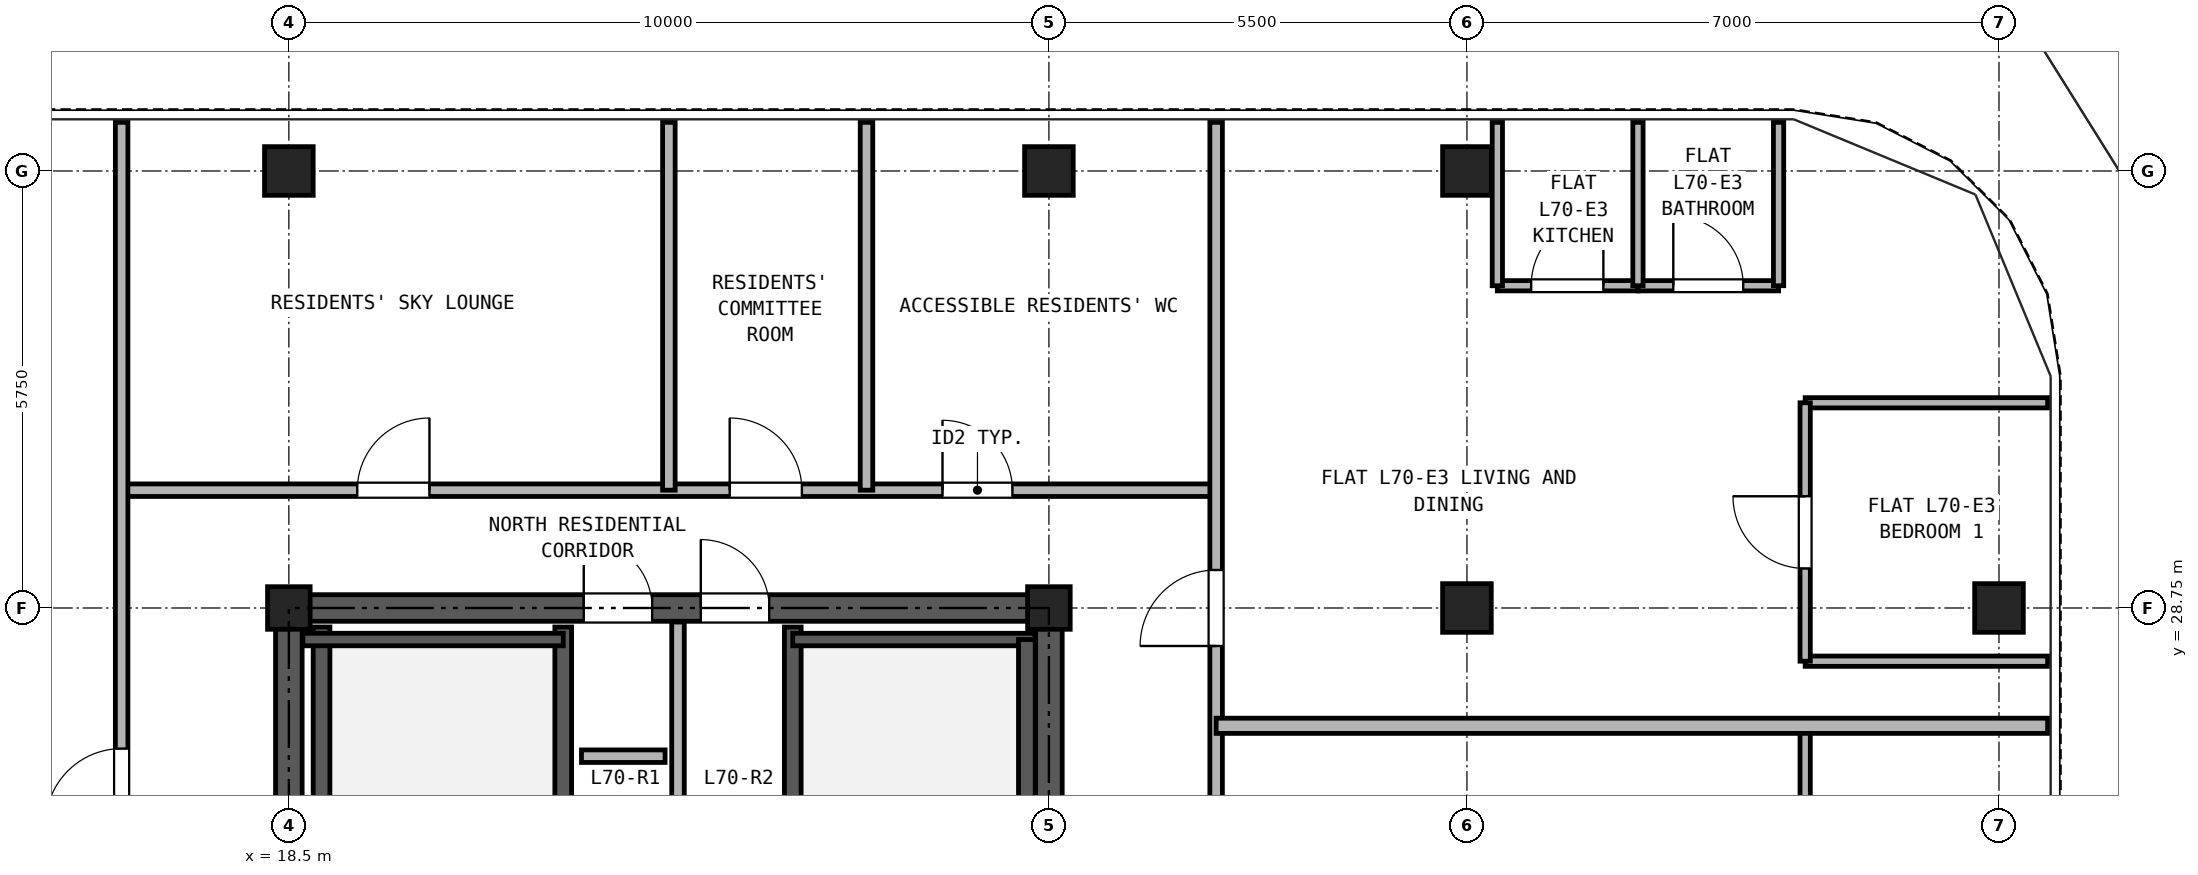
"""IFC4 building model, lengths in metres.
Left out: names, types, materials, properties, quantities, classifications, styles, units other than length and angle.
Written with IfcOpenShell. Run it as: python <this file> out.ifc"""

import sys

from ifc_helpers import new_model, si_unit, direction, frame, frame_2d, origin, origin_2d, place, context, subcontext, project, spatial, rectangle, hollow_rectangle, extrude, source, transform, mapped, element, fill, save


model = new_model("IFC4")
c1 = context("Model", 3, precision=1e-05, world=origin(), true_north=direction((0.0, 1.0)))
c2 = subcontext(c1, "Body", "Model", "MODEL_VIEW")
j1 = project(units=[si_unit("LENGTHUNIT", "METRE"), si_unit("PLANEANGLEUNIT", "RADIAN")], contexts=[c1])
p1 = place(None, origin())
s1 = spatial("IfcSite", under=j1, at=p1, CompositionType="ELEMENT")
p2 = place(p1, origin())
s2 = spatial("IfcBuilding", under=s1, at=p2, CompositionType="ELEMENT")
p3 = place(p2, frame((0.0, 0.0, 245.7)))
s3 = spatial("IfcBuildingStorey", under=s2, at=p3, CompositionType="ELEMENT", Elevation=245.7)
m1 = source(origin(), c2, "Body", "SweptSolid", [
    extrude(hollow_rectangle(XDim=0.64, YDim=0.64, WallThickness=0.035, at=origin_2d()), origin(), (0.0, 0.0, 1.0), 2.98),
])
for number, where, z_axis, x_axis in (
    (1, (18.5, 34.5, 0.0), (0.0, 0.0, 1.0), (1.0, 0.0, 0.0)),
    (2, (28.5, 34.5, 0.0), (0.0, 0.0, 1.0), (1.0, 0.0, 0.0)),
    (3, (34.0, 34.5, 0.0), (0.0, 0.0, 1.0), (1.0, 0.0, 0.0)),
    (4, (41.0, 28.75, 0.0), (0.0, 0.0, 1.0), (1.0, 0.0, 0.0)),
):
    element("IfcColumn", number, at=place(p3, frame(where, z_axis=z_axis, x_axis=x_axis)), inside=s3, PredefinedType="COLUMN", context=c2, shape_type="MappedRepresentation", body=[
        mapped(m1, transform((0.0, 0.0, 0.0), x_axis=(1.0, 0.0, 0.0), y_axis=(0.0, 1.0, 0.0), z_axis=(0.0, 0.0, 1.0), scale=1.0)),
    ])
m2 = source(origin(), c2, "Body", "SweptSolid", [
    extrude(hollow_rectangle(XDim=0.56, YDim=0.56, WallThickness=0.03, at=origin_2d()), origin(), (0.0, 0.0, 1.0), 2.98),
])
for number, where, z_axis, x_axis in (
    (5, (18.5, 28.75, 0.0), (0.0, 0.0, 1.0), (1.0, 0.0, 0.0)),
    (6, (28.5, 28.75, 0.0), (0.0, 0.0, 1.0), (1.0, 0.0, 0.0)),
):
    element("IfcColumn", number, at=place(p3, frame(where, z_axis=z_axis, x_axis=x_axis)), inside=s3, PredefinedType="COLUMN", context=c2, shape_type="MappedRepresentation", body=[
        mapped(m2, transform((0.0, 0.0, 0.0), x_axis=(1.0, 0.0, 0.0), y_axis=(0.0, 1.0, 0.0), z_axis=(0.0, 0.0, 1.0), scale=1.0)),
    ])
p4 = place(p3, frame((34.0, 28.75, 0.0), z_axis=(0.0, 0.0, 1.0), x_axis=(1.0, 0.0, 0.0)))
e7 = element("IfcColumn", 7, at=p4, inside=s3, PredefinedType="COLUMN", context=c2, shape_type="MappedRepresentation", body=[
    mapped(m1, transform((0.0, 0.0, 0.0), x_axis=(1.0, 0.0, 0.0), y_axis=(0.0, 1.0, 0.0), z_axis=(0.0, 0.0, 1.0), scale=1.0)),
])
p5 = place(p3, frame((18.325, 28.75, 0.0), z_axis=(0.0, 0.0, 1.0), x_axis=(1.0, 0.0, 0.0)))
e8 = element("IfcWall", 8, at=p5, inside=s3, PredefinedType="SHEAR", context=c2, shape_type="SweptSolid", body=[
    extrude(rectangle(XDim=10.35, YDim=0.35, at=frame_2d((5.175, 0.0))), origin(), (0.0, 0.0, 1.0), 2.98),
])
p6 = place(p5, frame((4.055, 0.0, 0.0)))
e9 = element("IfcOpeningElement", 9, at=p6, cuts=e8, PredefinedType="OPENING", context=c2, shape_type="SweptSolid", body=[
    extrude(rectangle(XDim=0.9, YDim=2.05, at=frame_2d((0.45, 1.025))), frame((0.0, 0.185, 0.0), z_axis=(0.0, -1.0, 0.0), x_axis=(1.0, 0.0, 0.0)), (0.0, 0.0, 1.0), 0.37),
])
p7 = place(p5, frame((5.595, 0.0, 0.0)))
e10 = element("IfcOpeningElement", 10, at=p7, cuts=e8, PredefinedType="OPENING", context=c2, shape_type="SweptSolid", body=[
    extrude(rectangle(XDim=0.9, YDim=2.05, at=frame_2d((0.45, 1.025))), frame((0.0, 0.185, 0.0), z_axis=(0.0, -1.0, 0.0), x_axis=(1.0, 0.0, 0.0)), (0.0, 0.0, 1.0), 0.37),
])
p8 = place(p3, frame((18.5, 11.675, 0.0), z_axis=(0.0, 0.0, 1.0), x_axis=(0.0, 1.0, 0.0)))
e11 = element("IfcWall", 11, at=p8, inside=s3, PredefinedType="SHEAR", context=c2, shape_type="SweptSolid", body=[
    extrude(rectangle(XDim=16.9, YDim=0.35, at=frame_2d((8.45, 0.0))), origin(), (0.0, 0.0, 1.0), 2.98),
])
p9 = place(p8, frame((7.475, 0.0, 0.0)))
e12 = element("IfcOpeningElement", 12, at=p9, cuts=e11, PredefinedType="OPENING", context=c2, shape_type="SweptSolid", body=[
    extrude(rectangle(XDim=1.15, YDim=2.2, at=frame_2d((0.575, 1.1))), frame((0.0, 0.185, 0.0), z_axis=(0.0, -1.0, 0.0), x_axis=(1.0, 0.0, 0.0)), (0.0, 0.0, 1.0), 0.37),
])
p10 = place(p3, frame((28.5, 11.675, 0.0), z_axis=(0.0, 0.0, 1.0), x_axis=(0.0, 1.0, 0.0)))
e13 = element("IfcWall", 13, at=p10, inside=s3, PredefinedType="SHEAR", context=c2, shape_type="SweptSolid", body=[
    extrude(rectangle(XDim=16.9, YDim=0.35, at=frame_2d((8.45, 0.0))), origin(), (0.0, 0.0, 1.0), 2.98),
])
p11 = place(p10, frame((7.475, 0.0, 0.0)))
e14 = element("IfcOpeningElement", 14, at=p11, cuts=e13, PredefinedType="OPENING", context=c2, shape_type="SweptSolid", body=[
    extrude(rectangle(XDim=1.15, YDim=2.2, at=frame_2d((0.575, 1.1))), frame((0.0, 0.185, 0.0), z_axis=(0.0, -1.0, 0.0), x_axis=(1.0, 0.0, 0.0)), (0.0, 0.0, 1.0), 0.37),
])
for number, where, z_axis, x_axis in (
    (15, (18.93, 21.39, 0.0), (0.0, 0.0, 1.0), (0.0, 1.0, 0.0)),
    (16, (22.11, 21.39, 0.0), (0.0, 0.0, 1.0), (0.0, 1.0, 0.0)),
    (17, (25.13, 21.39, 0.0), (0.0, 0.0, 1.0), (0.0, 1.0, 0.0)),
):
    element("IfcWall", number, at=place(p3, frame(where, z_axis=z_axis, x_axis=x_axis)), inside=s3, PredefinedType="SOLIDWALL", context=c2, shape_type="SweptSolid", body=[
        extrude(rectangle(XDim=7.11, YDim=0.22, at=frame_2d((3.555, 0.0))), origin(), (0.0, 0.0, 1.0), 2.98),
    ])
p12 = place(p3, frame((18.685, 28.335, 0.0), z_axis=(0.0, 0.0, 1.0), x_axis=(1.0, 0.0, 0.0)))
e18 = element("IfcWall", 18, at=p12, inside=s3, PredefinedType="PARTITIONING", context=c2, shape_type="SweptSolid", body=[
    extrude(rectangle(XDim=3.425, YDim=0.165, at=frame_2d((1.712, 0.0))), origin(), (0.0, 0.0, 1.0), 2.98),
])
p13 = place(p3, frame((25.13, 28.335, 0.0), z_axis=(0.0, 0.0, 1.0), x_axis=(1.0, 0.0, 0.0)))
e19 = element("IfcWall", 19, at=p13, inside=s3, PredefinedType="PARTITIONING", context=c2, shape_type="SweptSolid", body=[
    extrude(rectangle(XDim=3.185, YDim=0.165, at=frame_2d((1.593, 0.0))), origin(), (0.0, 0.0, 1.0), 2.98),
])
p14 = place(p3, frame((28.21, 21.39, 0.0), z_axis=(0.0, 0.0, 1.0), x_axis=(0.0, 1.0, 0.0)))
e20 = element("IfcWall", 20, at=p14, inside=s3, PredefinedType="SOLIDWALL", context=c2, shape_type="SweptSolid", body=[
    extrude(rectangle(XDim=6.945, YDim=0.22, at=frame_2d((3.473, 0.0))), origin(), (0.0, 0.0, 1.0), 2.98),
])
p15 = place(p3, frame((23.62, 24.4, 0.0), z_axis=(0.0, 0.0, 1.0), x_axis=(0.0, 1.0, 0.0)))
e21 = element("IfcWall", 21, at=p15, inside=s3, PredefinedType="PARTITIONING", context=c2, shape_type="SweptSolid", body=[
    extrude(rectangle(XDim=4.165, YDim=0.165, at=frame_2d((2.083, 0.0))), origin(), (0.0, 0.0, 1.0), 2.98),
])
p16 = place(p3, frame((16.3, 30.3, 0.0), z_axis=(0.0, 0.0, 1.0), x_axis=(1.0, 0.0, 0.0)))
e22 = element("IfcWall", 22, at=p16, inside=s3, PredefinedType="PARTITIONING", context=c2, shape_type="SweptSolid", body=[
    extrude(rectangle(XDim=14.4, YDim=0.165, at=frame_2d((7.2, 0.0))), origin(), (0.0, 0.0, 1.0), 2.98),
])
p17 = place(p16, frame((3.1, 0.0, 0.0)))
e23 = element("IfcOpeningElement", 23, at=p17, cuts=e22, PredefinedType="OPENING", context=c2, shape_type="SweptSolid", body=[
    extrude(rectangle(XDim=0.95, YDim=2.15, at=frame_2d((0.475, 1.075))), frame((0.0, 0.093, 0.0), z_axis=(0.0, -1.0, 0.0), x_axis=(1.0, 0.0, 0.0)), (0.0, 0.0, 1.0), 0.185),
])
p18 = place(p16, frame((8.0, 0.0, 0.0)))
e24 = element("IfcOpeningElement", 24, at=p18, cuts=e22, PredefinedType="OPENING", context=c2, shape_type="SweptSolid", body=[
    extrude(rectangle(XDim=0.95, YDim=2.15, at=frame_2d((0.475, 1.075))), frame((0.0, 0.093, 0.0), z_axis=(0.0, -1.0, 0.0), x_axis=(1.0, 0.0, 0.0)), (0.0, 0.0, 1.0), 0.185),
])
p19 = place(p16, frame((10.8, 0.0, 0.0)))
e25 = element("IfcOpeningElement", 25, at=p19, cuts=e22, PredefinedType="OPENING", context=c2, shape_type="SweptSolid", body=[
    extrude(rectangle(XDim=0.92, YDim=2.1, at=frame_2d((0.46, 1.05))), frame((0.0, 0.093, 0.0), z_axis=(0.0, -1.0, 0.0), x_axis=(1.0, 0.0, 0.0)), (0.0, 0.0, 1.0), 0.185),
])
p20 = place(p3, frame((16.3, 11.2, 0.0), z_axis=(0.0, 0.0, 1.0), x_axis=(0.0, 1.0, 0.0)))
e26 = element("IfcWall", 26, at=p20, inside=s3, PredefinedType="PARTITIONING", context=c2, shape_type="SweptSolid", body=[
    extrude(rectangle(XDim=23.94, YDim=0.165, at=frame_2d((11.97, 0.0))), origin(), (0.0, 0.0, 1.0), 2.98),
])
p21 = place(p20, frame((5.15, 0.0, 0.0)))
e27 = element("IfcOpeningElement", 27, at=p21, cuts=e26, PredefinedType="OPENING", context=c2, shape_type="SweptSolid", body=[
    extrude(rectangle(XDim=1.0, YDim=2.15, at=frame_2d((0.5, 1.075))), frame((0.0, 0.093, 0.0), z_axis=(0.0, -1.0, 0.0), x_axis=(1.0, 0.0, 0.0)), (0.0, 0.0, 1.0), 0.185),
])
p22 = place(p20, frame((14.7, 0.0, 0.0)))
e28 = element("IfcOpeningElement", 28, at=p22, cuts=e26, PredefinedType="OPENING", context=c2, shape_type="SweptSolid", body=[
    extrude(rectangle(XDim=1.0, YDim=2.15, at=frame_2d((0.5, 1.075))), frame((0.0, 0.093, 0.0), z_axis=(0.0, -1.0, 0.0), x_axis=(1.0, 0.0, 0.0)), (0.0, 0.0, 1.0), 0.185),
])
p23 = place(p3, frame((30.7, 11.2, 0.0), z_axis=(0.0, 0.0, 1.0), x_axis=(0.0, 1.0, 0.0)))
e29 = element("IfcWall", 29, at=p23, inside=s3, PredefinedType="PARTITIONING", context=c2, shape_type="SweptSolid", body=[
    extrude(rectangle(XDim=23.94, YDim=0.165, at=frame_2d((11.97, 0.0))), origin(), (0.0, 0.0, 1.0), 2.98),
])
p24 = place(p23, frame((3.4, 0.0, 0.0)))
e30 = element("IfcOpeningElement", 30, at=p24, cuts=e29, PredefinedType="OPENING", context=c2, shape_type="SweptSolid", body=[
    extrude(rectangle(XDim=1.0, YDim=2.15, at=frame_2d((0.5, 1.075))), frame((0.0, 0.093, 0.0), z_axis=(0.0, -1.0, 0.0), x_axis=(1.0, 0.0, 0.0)), (0.0, 0.0, 1.0), 0.185),
])
p25 = place(p23, frame((11.4, 0.0, 0.0)))
e31 = element("IfcOpeningElement", 31, at=p25, cuts=e29, PredefinedType="OPENING", context=c2, shape_type="SweptSolid", body=[
    extrude(rectangle(XDim=1.0, YDim=2.15, at=frame_2d((0.5, 1.075))), frame((0.0, 0.093, 0.0), z_axis=(0.0, -1.0, 0.0), x_axis=(1.0, 0.0, 0.0)), (0.0, 0.0, 1.0), 0.185),
])
p26 = place(p23, frame((17.05, 0.0, 0.0)))
e32 = element("IfcOpeningElement", 32, at=p26, cuts=e29, PredefinedType="OPENING", context=c2, shape_type="SweptSolid", body=[
    extrude(rectangle(XDim=1.0, YDim=2.15, at=frame_2d((0.5, 1.075))), frame((0.0, 0.093, 0.0), z_axis=(0.0, -1.0, 0.0), x_axis=(1.0, 0.0, 0.0)), (0.0, 0.0, 1.0), 0.185),
])
p27 = place(p3, frame((38.45, 22.916, 0.0), z_axis=(0.0, 0.0, 1.0), x_axis=(0.0, 1.0, 0.0)))
e33 = element("IfcWall", 33, at=p27, inside=s3, PredefinedType="PARTITIONING", context=c2, shape_type="SweptSolid", body=[
    extrude(rectangle(XDim=4.284, YDim=0.135, at=frame_2d((2.142, 0.0))), origin(), (0.0, 0.0, 1.0), 2.98),
])
p28 = place(p27, frame((1.662, 0.0, 0.0)))
e34 = element("IfcOpeningElement", 34, at=p28, cuts=e33, PredefinedType="OPENING", context=c2, shape_type="SweptSolid", body=[
    extrude(rectangle(XDim=0.95, YDim=2.15, at=frame_2d((0.475, 1.075))), frame((0.0, 0.077, 0.0), z_axis=(0.0, -1.0, 0.0), x_axis=(1.0, 0.0, 0.0)), (0.0, 0.0, 1.0), 0.155),
])
p29 = place(p3, frame((30.7, 27.2, 0.0), z_axis=(0.0, 0.0, 1.0), x_axis=(1.0, 0.0, 0.0)))
e35 = element("IfcWall", 35, at=p29, inside=s3, PredefinedType="PARTITIONING", context=c2, shape_type="SweptSolid", body=[
    extrude(rectangle(XDim=10.94, YDim=0.2, at=frame_2d((5.47, 0.0))), origin(), (0.0, 0.0, 1.0), 2.98),
])
p30 = place(p3, frame((34.4, 32.99, 0.0), z_axis=(0.0, 0.0, 1.0), x_axis=(1.0, 0.0, 0.0)))
e36 = element("IfcWall", 36, at=p30, inside=s3, PredefinedType="PARTITIONING", context=c2, shape_type="SweptSolid", body=[
    extrude(rectangle(XDim=1.85, YDim=0.135, at=frame_2d((0.925, 0.0))), origin(), (0.0, 0.0, 1.0), 2.98),
])
p31 = place(p30, frame((0.445, 0.0, 0.0)))
e37 = element("IfcOpeningElement", 37, at=p31, cuts=e36, PredefinedType="OPENING", context=c2, shape_type="SweptSolid", body=[
    extrude(rectangle(XDim=0.95, YDim=2.15, at=frame_2d((0.475, 1.075))), frame((0.0, 0.077, 0.0), z_axis=(0.0, -1.0, 0.0), x_axis=(1.0, 0.0, 0.0)), (0.0, 0.0, 1.0), 0.155),
])
p32 = place(p3, frame((36.25, 32.99, 0.0), z_axis=(0.0, 0.0, 1.0), x_axis=(1.0, 0.0, 0.0)))
e38 = element("IfcWall", 38, at=p32, inside=s3, PredefinedType="PARTITIONING", context=c2, shape_type="SweptSolid", body=[
    extrude(rectangle(XDim=1.85, YDim=0.135, at=frame_2d((0.925, 0.0))), origin(), (0.0, 0.0, 1.0), 2.98),
])
p33 = place(p32, frame((0.465, 0.0, 0.0)))
e39 = element("IfcOpeningElement", 39, at=p33, cuts=e38, PredefinedType="OPENING", context=c2, shape_type="SweptSolid", body=[
    extrude(rectangle(XDim=0.92, YDim=2.1, at=frame_2d((0.46, 1.05))), frame((0.0, 0.077, 0.0), z_axis=(0.0, -1.0, 0.0), x_axis=(1.0, 0.0, 0.0)), (0.0, 0.0, 1.0), 0.155),
])
for number, where, z_axis, x_axis in (
    (40, (34.4, 32.99, 0.0), (0.0, 0.0, 1.0), (0.0, 1.0, 0.0)),
    (41, (36.25, 32.99, 0.0), (0.0, 0.0, 1.0), (0.0, 1.0, 0.0)),
    (42, (38.1, 32.99, 0.0), (0.0, 0.0, 1.0), (0.0, 1.0, 0.0)),
):
    element("IfcWall", number, at=place(p3, frame(where, z_axis=z_axis, x_axis=x_axis)), inside=s3, PredefinedType="PARTITIONING", context=c2, shape_type="SweptSolid", body=[
        extrude(rectangle(XDim=2.15, YDim=0.135, at=frame_2d((1.075, 0.0))), origin(), (0.0, 0.0, 1.0), 2.98),
    ])
for number, where, z_axis, x_axis in (
    (43, (38.45, 28.05, 0.0), (0.0, 0.0, 1.0), (1.0, 0.0, 0.0)),
    (44, (38.45, 31.45, 0.0), (0.0, 0.0, 1.0), (1.0, 0.0, 0.0)),
):
    element("IfcWall", number, at=place(p3, frame(where, z_axis=z_axis, x_axis=x_axis)), inside=s3, PredefinedType="PARTITIONING", context=c2, shape_type="SweptSolid", body=[
        extrude(rectangle(XDim=3.19, YDim=0.135, at=frame_2d((1.595, 0.0))), origin(), (0.0, 0.0, 1.0), 2.98),
    ])
p34 = place(p3, frame((38.45, 28.05, 0.0), z_axis=(0.0, 0.0, 1.0), x_axis=(0.0, 1.0, 0.0)))
e45 = element("IfcWall", 45, at=p34, inside=s3, PredefinedType="PARTITIONING", context=c2, shape_type="SweptSolid", body=[
    extrude(rectangle(XDim=3.4, YDim=0.135, at=frame_2d((1.7, 0.0))), origin(), (0.0, 0.0, 1.0), 2.98),
])
p35 = place(p34, frame((1.22, 0.0, 0.0)))
e46 = element("IfcOpeningElement", 46, at=p35, cuts=e45, PredefinedType="OPENING", context=c2, shape_type="SweptSolid", body=[
    extrude(rectangle(XDim=0.95, YDim=2.15, at=frame_2d((0.475, 1.075))), frame((0.0, 0.077, 0.0), z_axis=(0.0, -1.0, 0.0), x_axis=(1.0, 0.0, 0.0)), (0.0, 0.0, 1.0), 0.155),
])
for number, where, z_axis, x_axis in (
    (47, (23.5, 30.3, 0.0), (0.0, 0.0, 1.0), (0.0, 1.0, 0.0)),
    (48, (26.1, 30.3, 0.0), (0.0, 0.0, 1.0), (0.0, 1.0, 0.0)),
):
    element("IfcWall", number, at=place(p3, frame(where, z_axis=z_axis, x_axis=x_axis)), inside=s3, PredefinedType="PARTITIONING", context=c2, shape_type="SweptSolid", body=[
        extrude(rectangle(XDim=4.84, YDim=0.165, at=frame_2d((2.42, 0.0))), origin(), (0.0, 0.0, 1.0), 2.98),
    ])
p36 = place(p3, frame((22.35, 26.8, 0.0), z_axis=(0.0, 0.0, 1.0), x_axis=(1.0, 0.0, 0.0)))
e49 = element("IfcWall", 49, at=p36, inside=s3, PredefinedType="PARTITIONING", context=c2, shape_type="SweptSolid", body=[
    extrude(rectangle(XDim=1.1, YDim=0.165, at=frame_2d((0.55, 0.0))), origin(), (0.0, 0.0, 1.0), 2.98),
])
p37 = place(p6, origin())
e50 = element("IfcDoor", 50, at=p37, inside=s3, OperationType="SINGLE_SWING_LEFT", PredefinedType="DOOR", context=c2, shape_type="SweptSolid", body=[
    extrude(rectangle(XDim=0.9, YDim=2.05, at=frame_2d((0.45, 1.025))), frame((0.0, 0.025, 0.0), z_axis=(0.0, -1.0, 0.0), x_axis=(1.0, 0.0, 0.0)), (0.0, 0.0, 1.0), 0.05),
])
fill(e9, e50)
p38 = place(p7, origin())
e51 = element("IfcDoor", 51, at=p38, inside=s3, OperationType="SINGLE_SWING_LEFT", PredefinedType="DOOR", context=c2, shape_type="SweptSolid", body=[
    extrude(rectangle(XDim=0.9, YDim=2.05, at=frame_2d((0.45, 1.025))), frame((0.0, 0.025, 0.0), z_axis=(0.0, -1.0, 0.0), x_axis=(1.0, 0.0, 0.0)), (0.0, 0.0, 1.0), 0.05),
])
fill(e10, e51)
p39 = place(p22, origin())
e52 = element("IfcDoor", 52, at=p39, inside=s3, OperationType="SINGLE_SWING_LEFT", PredefinedType="DOOR", context=c2, shape_type="SweptSolid", body=[
    extrude(rectangle(XDim=1.0, YDim=2.15, at=frame_2d((0.5, 1.075))), frame((0.0, 0.025, 0.0), z_axis=(0.0, -1.0, 0.0), x_axis=(1.0, 0.0, 0.0)), (0.0, 0.0, 1.0), 0.05),
])
fill(e28, e52)
p40 = place(p31, frame((0.95, 0.0, 0.0), z_axis=(0.0, 0.0, 1.0), x_axis=(-1.0, 0.0, 0.0)))
e53 = element("IfcDoor", 53, at=p40, inside=s3, OperationType="SINGLE_SWING_RIGHT", PredefinedType="DOOR", context=c2, shape_type="SweptSolid", body=[
    extrude(rectangle(XDim=0.95, YDim=2.15, at=frame_2d((0.475, 1.075))), frame((0.0, 0.025, 0.0), z_axis=(0.0, -1.0, 0.0), x_axis=(1.0, 0.0, 0.0)), (0.0, 0.0, 1.0), 0.05),
])
fill(e37, e53)
p41 = place(p33, frame((0.92, 0.0, 0.0), z_axis=(0.0, 0.0, 1.0), x_axis=(-1.0, 0.0, 0.0)))
e54 = element("IfcDoor", 54, at=p41, inside=s3, OperationType="SINGLE_SWING_LEFT", PredefinedType="DOOR", context=c2, shape_type="SweptSolid", body=[
    extrude(rectangle(XDim=0.92, YDim=2.1, at=frame_2d((0.46, 1.05))), frame((0.0, 0.025, 0.0), z_axis=(0.0, -1.0, 0.0), x_axis=(1.0, 0.0, 0.0)), (0.0, 0.0, 1.0), 0.05),
])
fill(e39, e54)
p42 = place(p35, frame((0.95, 0.0, 0.0), z_axis=(0.0, 0.0, 1.0), x_axis=(-1.0, 0.0, 0.0)))
e55 = element("IfcDoor", 55, at=p42, inside=s3, OperationType="SINGLE_SWING_RIGHT", PredefinedType="DOOR", context=c2, shape_type="SweptSolid", body=[
    extrude(rectangle(XDim=0.95, YDim=2.15, at=frame_2d((0.475, 1.075))), frame((0.0, 0.025, 0.0), z_axis=(0.0, -1.0, 0.0), x_axis=(1.0, 0.0, 0.0)), (0.0, 0.0, 1.0), 0.05),
])
fill(e46, e55)
p43 = place(p26, frame((1.0, 0.0, 0.0), z_axis=(0.0, 0.0, 1.0), x_axis=(-1.0, 0.0, 0.0)))
e56 = element("IfcDoor", 56, at=p43, inside=s3, OperationType="SINGLE_SWING_LEFT", PredefinedType="DOOR", context=c2, shape_type="SweptSolid", body=[
    extrude(rectangle(XDim=1.0, YDim=2.15, at=frame_2d((0.5, 1.075))), frame((0.0, 0.025, 0.0), z_axis=(0.0, -1.0, 0.0), x_axis=(1.0, 0.0, 0.0)), (0.0, 0.0, 1.0), 0.05),
])
fill(e32, e56)
p44 = place(p17, origin())
e57 = element("IfcDoor", 57, at=p44, inside=s3, OperationType="SINGLE_SWING_RIGHT", PredefinedType="DOOR", context=c2, shape_type="SweptSolid", body=[
    extrude(rectangle(XDim=0.95, YDim=2.15, at=frame_2d((0.475, 1.075))), frame((0.0, 0.025, 0.0), z_axis=(0.0, -1.0, 0.0), x_axis=(1.0, 0.0, 0.0)), (0.0, 0.0, 1.0), 0.05),
])
fill(e23, e57)
p45 = place(p18, origin())
e58 = element("IfcDoor", 58, at=p45, inside=s3, OperationType="SINGLE_SWING_LEFT", PredefinedType="DOOR", context=c2, shape_type="SweptSolid", body=[
    extrude(rectangle(XDim=0.95, YDim=2.15, at=frame_2d((0.475, 1.075))), frame((0.0, 0.025, 0.0), z_axis=(0.0, -1.0, 0.0), x_axis=(1.0, 0.0, 0.0)), (0.0, 0.0, 1.0), 0.05),
])
fill(e24, e58)
p46 = place(p19, origin())
e59 = element("IfcDoor", 59, at=p46, inside=s3, OperationType="SINGLE_SWING_LEFT", PredefinedType="DOOR", context=c2, shape_type="SweptSolid", body=[
    extrude(rectangle(XDim=0.92, YDim=2.1, at=frame_2d((0.46, 1.05))), frame((0.0, 0.025, 0.0), z_axis=(0.0, -1.0, 0.0), x_axis=(1.0, 0.0, 0.0)), (0.0, 0.0, 1.0), 0.05),
])
fill(e25, e59)
save(model, sys.argv[1])
